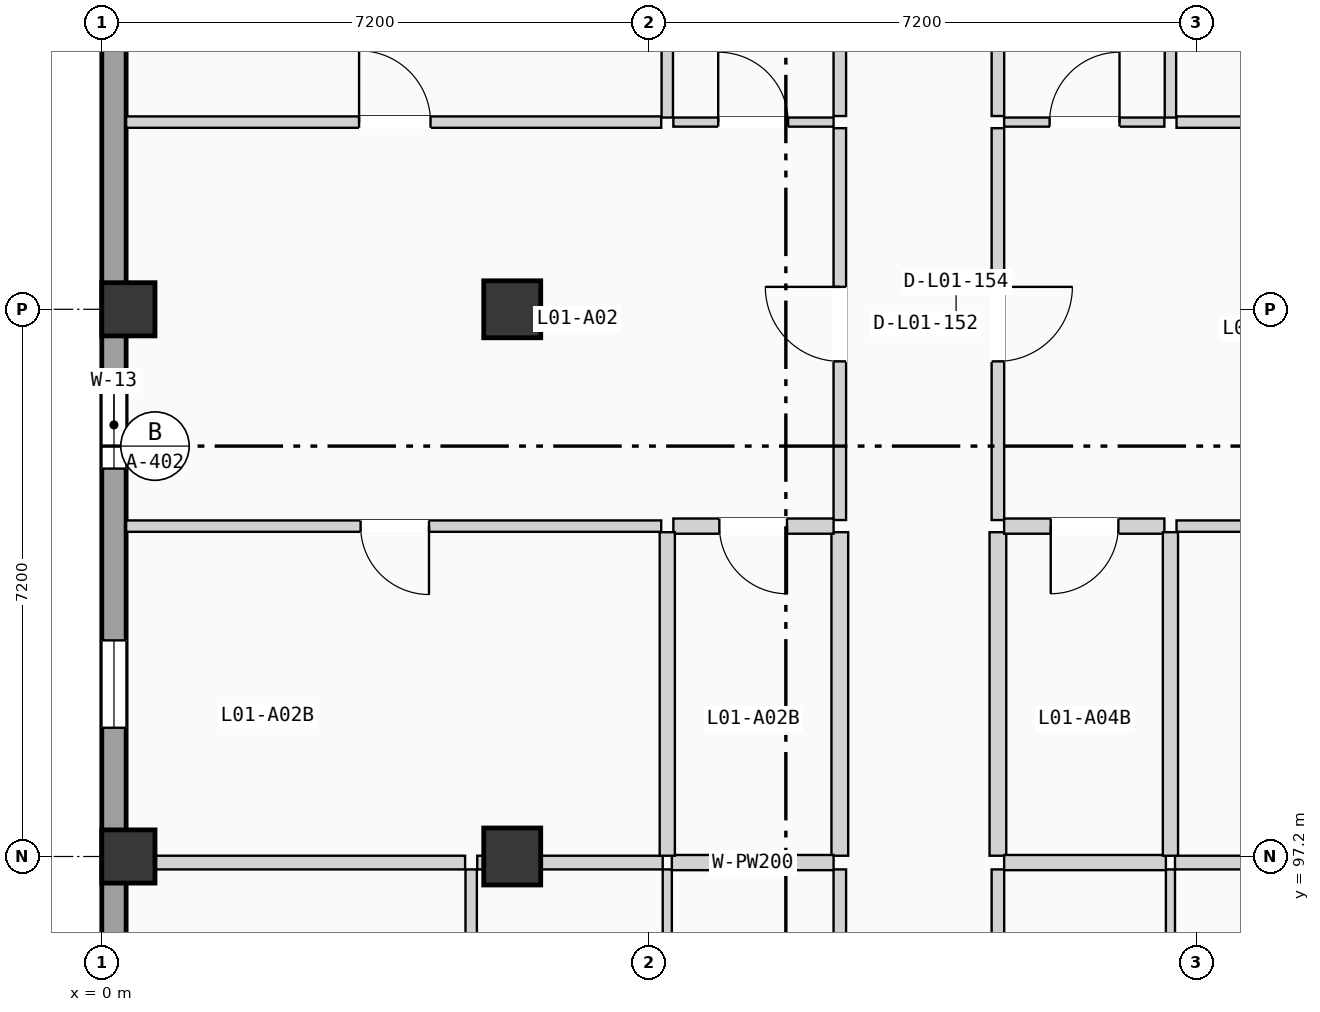
"""IFC4 building model, lengths in metres.
Left out: names, types, materials, properties, quantities, classifications, styles, units other than length and angle.
Written with IfcOpenShell. Run it as: python <this file> out.ifc"""

import sys

from ifc_helpers import new_model, si_unit, direction, frame, frame_2d, origin, origin_2d, place, context, subcontext, project, spatial, rectangle, extrude, element, fill, save


model = new_model("IFC4")
c1 = context("Model", 3, precision=1e-05, world=origin(), true_north=direction((0.0, 1.0)))
c2 = subcontext(c1, "Body", "Model", "MODEL_VIEW")
j1 = project(units=[si_unit("LENGTHUNIT", "METRE"), si_unit("PLANEANGLEUNIT", "RADIAN")], contexts=[c1])
p1 = place(None, origin())
s1 = spatial("IfcSite", under=j1, at=p1, CompositionType="ELEMENT")
p2 = place(p1, origin())
s2 = spatial("IfcBuilding", under=s1, at=p2, CompositionType="ELEMENT")
p3 = place(p2, frame((0.0, 0.0, 4.9)))
s3 = spatial("IfcBuildingStorey", under=s2, at=p3, CompositionType="ELEMENT", Elevation=4.9)
for number, where, z_axis, x_axis in (
    (1, (0.35, 97.2, 0.0), (0.0, 0.0, 1.0), (1.0, 0.0, 0.0)),
    (2, (0.35, 104.4, 0.0), (0.0, 0.0, 1.0), (1.0, 0.0, 0.0)),
):
    element("IfcColumn", number, at=place(p3, frame(where, z_axis=z_axis, x_axis=x_axis)), inside=s3, PredefinedType="COLUMN", context=c2, shape_type="SweptSolid", body=[
        extrude(rectangle(XDim=0.7, YDim=0.7, at=origin_2d()), origin(), (0.0, 0.0, 1.0), 3.675),
    ])
for number, where, z_axis, x_axis in (
    (3, (5.4, 97.2, 0.0), (0.0, 0.0, 1.0), (1.0, 0.0, 0.0)),
    (4, (5.4, 104.4, 0.0), (0.0, 0.0, 1.0), (1.0, 0.0, 0.0)),
):
    element("IfcColumn", number, at=place(p3, frame(where, z_axis=z_axis, x_axis=x_axis)), inside=s3, PredefinedType="COLUMN", context=c2, shape_type="SweptSolid", body=[
        extrude(rectangle(XDim=0.75, YDim=0.75, at=origin_2d()), origin(), (0.0, 0.0, 1.0), 3.675),
    ])
p4 = place(p3, frame((0.16, 68.72, 0.0), z_axis=(0.0, 0.0, 1.0), x_axis=(0.0, 1.0, 0.0)))
e5 = element("IfcWall", 5, at=p4, inside=s3, PredefinedType="SOLIDWALL", context=c2, shape_type="SweptSolid", body=[
    extrude(rectangle(XDim=49.76, YDim=0.32, at=frame_2d((24.88, 0.0))), origin(), (0.0, 0.0, 1.0), 3.415),
])
p5 = place(p4, frame((17.155, 0.0, 0.9)))
e6 = element("IfcOpeningElement", 6, at=p5, cuts=e5, PredefinedType="OPENING", context=c2, shape_type="SweptSolid", body=[
    extrude(rectangle(XDim=1.05, YDim=1.8, at=frame_2d((0.525, 0.9))), frame((0.0, 0.17, 0.0), z_axis=(0.0, -1.0, 0.0), x_axis=(1.0, 0.0, 0.0)), (0.0, 0.0, 1.0), 0.34),
])
p6 = place(p4, frame((9.97, 0.0, 0.9)))
e7 = element("IfcOpeningElement", 7, at=p6, cuts=e5, PredefinedType="OPENING", context=c2, shape_type="SweptSolid", body=[
    extrude(rectangle(XDim=1.15, YDim=1.2, at=frame_2d((0.575, 0.6))), frame((0.0, 0.17, 0.0), z_axis=(0.0, -1.0, 0.0), x_axis=(1.0, 0.0, 0.0)), (0.0, 0.0, 1.0), 0.34),
])
p7 = place(p4, frame((24.305, 0.0, 0.9)))
e8 = element("IfcOpeningElement", 8, at=p7, cuts=e5, PredefinedType="OPENING", context=c2, shape_type="SweptSolid", body=[
    extrude(rectangle(XDim=1.15, YDim=1.35, at=frame_2d((0.575, 0.675))), frame((0.0, 0.17, 0.0), z_axis=(0.0, -1.0, 0.0), x_axis=(1.0, 0.0, 0.0)), (0.0, 0.0, 1.0), 0.34),
])
p8 = place(p4, frame((33.584, 0.0, 0.9)))
e9 = element("IfcOpeningElement", 9, at=p8, cuts=e5, PredefinedType="OPENING", context=c2, shape_type="SweptSolid", body=[
    extrude(rectangle(XDim=1.15, YDim=1.5, at=frame_2d((0.575, 0.75))), frame((0.0, 0.17, 0.0), z_axis=(0.0, -1.0, 0.0), x_axis=(1.0, 0.0, 0.0)), (0.0, 0.0, 1.0), 0.34),
])
p9 = place(p4, frame((30.174, 0.0, 0.9)))
e10 = element("IfcOpeningElement", 10, at=p9, cuts=e5, PredefinedType="OPENING", context=c2, shape_type="SweptSolid", body=[
    extrude(rectangle(XDim=1.15, YDim=1.65, at=frame_2d((0.575, 0.825))), frame((0.0, 0.17, 0.0), z_axis=(0.0, -1.0, 0.0), x_axis=(1.0, 0.0, 0.0)), (0.0, 0.0, 1.0), 0.34),
])
p10 = place(p4, frame((39.776, 0.0, 0.9)))
e11 = element("IfcOpeningElement", 11, at=p10, cuts=e5, PredefinedType="OPENING", context=c2, shape_type="SweptSolid", body=[
    extrude(rectangle(XDim=1.15, YDim=1.8, at=frame_2d((0.575, 0.9))), frame((0.0, 0.17, 0.0), z_axis=(0.0, -1.0, 0.0), x_axis=(1.0, 0.0, 0.0)), (0.0, 0.0, 1.0), 0.34),
])
p11 = place(p3, frame((9.71, 89.13, 0.0), z_axis=(0.0, 0.0, 1.0), x_axis=(0.0, 1.0, 0.0)))
e12 = element("IfcWall", 12, at=p11, inside=s3, PredefinedType="PARTITIONING", context=c2, shape_type="SweptSolid", body=[
    extrude(rectangle(XDim=7.9, YDim=0.165, at=frame_2d((3.95, 0.0))), origin(), (0.0, 0.0, 1.0), 3.395),
])
p12 = place(p3, frame((9.71, 101.627, 0.0), z_axis=(0.0, 0.0, 1.0), x_axis=(0.0, 1.0, 0.0)))
e13 = element("IfcWall", 13, at=p12, inside=s3, PredefinedType="PARTITIONING", context=c2, shape_type="SweptSolid", body=[
    extrude(rectangle(XDim=5.156, YDim=0.165, at=frame_2d((2.578, 0.0))), origin(), (0.0, 0.0, 1.0), 3.395),
])
p13 = place(p12, frame((2.088, 0.0, 0.0)))
e14 = element("IfcOpeningElement", 14, at=p13, cuts=e13, PredefinedType="OPENING", context=c2, shape_type="SweptSolid", body=[
    extrude(rectangle(XDim=0.98, YDim=2.08, at=frame_2d((0.49, 1.04))), frame((0.0, 0.093, 0.0), z_axis=(0.0, -1.0, 0.0), x_axis=(1.0, 0.0, 0.0)), (0.0, 0.0, 1.0), 0.185),
])
p14 = place(p3, frame((9.71, 97.21, 0.0), z_axis=(0.0, 0.0, 1.0), x_axis=(0.0, 1.0, 0.0)))
e15 = element("IfcWall", 15, at=p14, inside=s3, PredefinedType="PLUMBINGWALL", context=c2, shape_type="SweptSolid", body=[
    extrude(rectangle(XDim=4.257, YDim=0.22, at=frame_2d((2.128, 0.0))), origin(), (0.0, 0.0, 1.0), 3.395),
])
p15 = place(p3, frame((9.71, 106.943, 0.0), z_axis=(0.0, 0.0, 1.0), x_axis=(0.0, 1.0, 0.0)))
e16 = element("IfcWall", 16, at=p15, inside=s3, PredefinedType="PARTITIONING", context=c2, shape_type="SweptSolid", body=[
    extrude(rectangle(XDim=4.257, YDim=0.165, at=frame_2d((2.128, 0.0))), origin(), (0.0, 0.0, 1.0), 3.395),
])
p16 = place(p3, frame((11.79, 89.13, 0.0), z_axis=(0.0, 0.0, 1.0), x_axis=(0.0, 1.0, 0.0)))
e17 = element("IfcWall", 17, at=p16, inside=s3, PredefinedType="PARTITIONING", context=c2, shape_type="SweptSolid", body=[
    extrude(rectangle(XDim=7.9, YDim=0.165, at=frame_2d((3.95, 0.0))), origin(), (0.0, 0.0, 1.0), 3.395),
])
p17 = place(p3, frame((11.79, 101.627, 0.0), z_axis=(0.0, 0.0, 1.0), x_axis=(0.0, 1.0, 0.0)))
e18 = element("IfcWall", 18, at=p17, inside=s3, PredefinedType="PARTITIONING", context=c2, shape_type="SweptSolid", body=[
    extrude(rectangle(XDim=5.156, YDim=0.165, at=frame_2d((2.578, 0.0))), origin(), (0.0, 0.0, 1.0), 3.395),
])
p18 = place(p17, frame((2.088, 0.0, 0.0)))
e19 = element("IfcOpeningElement", 19, at=p18, cuts=e18, PredefinedType="OPENING", context=c2, shape_type="SweptSolid", body=[
    extrude(rectangle(XDim=0.98, YDim=2.08, at=frame_2d((0.49, 1.04))), frame((0.0, 0.093, 0.0), z_axis=(0.0, -1.0, 0.0), x_axis=(1.0, 0.0, 0.0)), (0.0, 0.0, 1.0), 0.185),
])
p19 = place(p3, frame((11.79, 97.21, 0.0), z_axis=(0.0, 0.0, 1.0), x_axis=(0.0, 1.0, 0.0)))
e20 = element("IfcWall", 20, at=p19, inside=s3, PredefinedType="PLUMBINGWALL", context=c2, shape_type="SweptSolid", body=[
    extrude(rectangle(XDim=4.257, YDim=0.22, at=frame_2d((2.128, 0.0))), origin(), (0.0, 0.0, 1.0), 3.395),
])
p20 = place(p3, frame((11.79, 106.943, 0.0), z_axis=(0.0, 0.0, 1.0), x_axis=(0.0, 1.0, 0.0)))
e21 = element("IfcWall", 21, at=p20, inside=s3, PredefinedType="PARTITIONING", context=c2, shape_type="SweptSolid", body=[
    extrude(rectangle(XDim=4.257, YDim=0.165, at=frame_2d((2.128, 0.0))), origin(), (0.0, 0.0, 1.0), 3.395),
])
p21 = place(p3, frame((7.44, 89.11, 0.0), z_axis=(0.0, 0.0, 1.0), x_axis=(0.0, 1.0, 0.0)))
e22 = element("IfcWall", 22, at=p21, inside=s3, PredefinedType="PARTITIONING", context=c2, shape_type="SweptSolid", body=[
    extrude(rectangle(XDim=7.92, YDim=0.12, at=frame_2d((3.96, 0.0))), origin(), (0.0, 0.0, 1.0), 3.395),
])
p22 = place(p3, frame((7.5, 97.12, 0.0), z_axis=(0.0, 0.0, 1.0), x_axis=(1.0, 0.0, 0.0)))
e23 = element("IfcWall", 23, at=p22, inside=s3, PredefinedType="PLUMBINGWALL", context=c2, shape_type="SweptSolid", body=[
    extrude(rectangle(XDim=2.128, YDim=0.2, at=frame_2d((1.064, 0.0))), origin(), (0.0, 0.0, 1.0), 2.685),
])
p23 = place(p3, frame((4.86, 89.11, 0.0), z_axis=(0.0, 0.0, 1.0), x_axis=(0.0, 1.0, 0.0)))
e24 = element("IfcWall", 24, at=p23, inside=s3, PredefinedType="PARTITIONING", context=c2, shape_type="SweptSolid", body=[
    extrude(rectangle(XDim=7.92, YDim=0.15, at=frame_2d((3.96, 0.0))), origin(), (0.0, 0.0, 1.0), 3.395),
])
p24 = place(p3, frame((0.32, 97.12, 0.0), z_axis=(0.0, 0.0, 1.0), x_axis=(1.0, 0.0, 0.0)))
e25 = element("IfcWall", 25, at=p24, inside=s3, PredefinedType="PARTITIONING", context=c2, shape_type="SweptSolid", body=[
    extrude(rectangle(XDim=4.46, YDim=0.18, at=frame_2d((2.23, 0.0))), origin(), (0.0, 0.0, 1.0), 2.735),
])
p25 = place(p3, frame((4.94, 97.12, 0.0), z_axis=(0.0, 0.0, 1.0), x_axis=(1.0, 0.0, 0.0)))
e26 = element("IfcWall", 26, at=p25, inside=s3, PredefinedType="PARTITIONING", context=c2, shape_type="SweptSolid", body=[
    extrude(rectangle(XDim=2.44, YDim=0.18, at=frame_2d((1.22, 0.0))), origin(), (0.0, 0.0, 1.0), 2.685),
])
p26 = place(p3, frame((7.52, 101.547, 0.0), z_axis=(0.0, 0.0, 1.0), x_axis=(1.0, 0.0, 0.0)))
e27 = element("IfcWall", 27, at=p26, inside=s3, PredefinedType="PLUMBINGWALL", context=c2, shape_type="SweptSolid", body=[
    extrude(rectangle(XDim=2.108, YDim=0.2, at=frame_2d((1.054, 0.0))), origin(), (0.0, 0.0, 1.0), 3.395),
])
p27 = place(p26, frame((0.605, 0.0, 0.0)))
e28 = element("IfcOpeningElement", 28, at=p27, cuts=e27, PredefinedType="OPENING", context=c2, shape_type="SweptSolid", body=[
    extrude(rectangle(XDim=0.89, YDim=2.03, at=frame_2d((0.445, 1.015))), frame((0.0, 0.11, 0.0), z_axis=(0.0, -1.0, 0.0), x_axis=(1.0, 0.0, 0.0)), (0.0, 0.0, 1.0), 0.22),
])
p28 = place(p3, frame((7.52, 106.863, 0.0), z_axis=(0.0, 0.0, 1.0), x_axis=(1.0, 0.0, 0.0)))
e29 = element("IfcWall", 29, at=p28, inside=s3, PredefinedType="PARTITIONING", context=c2, shape_type="SweptSolid", body=[
    extrude(rectangle(XDim=2.108, YDim=0.12, at=frame_2d((1.054, 0.0))), origin(), (0.0, 0.0, 1.0), 3.395),
])
p29 = place(p28, frame((0.59, 0.0, 0.0)))
e30 = element("IfcOpeningElement", 30, at=p29, cuts=e29, PredefinedType="OPENING", context=c2, shape_type="SweptSolid", body=[
    extrude(rectangle(XDim=0.92, YDim=2.02, at=frame_2d((0.46, 1.01))), frame((0.0, 0.07, 0.0), z_axis=(0.0, -1.0, 0.0), x_axis=(1.0, 0.0, 0.0)), (0.0, 0.0, 1.0), 0.14),
])
p30 = place(p3, frame((0.32, 101.547, 0.0), z_axis=(0.0, 0.0, 1.0), x_axis=(1.0, 0.0, 0.0)))
e31 = element("IfcWall", 31, at=p30, inside=s3, PredefinedType="PARTITIONING", context=c2, shape_type="SweptSolid", body=[
    extrude(rectangle(XDim=7.04, YDim=0.15, at=frame_2d((3.52, 0.0))), origin(), (0.0, 0.0, 1.0), 3.395),
])
p31 = place(p30, frame((3.085, 0.0, 0.0)))
e32 = element("IfcOpeningElement", 32, at=p31, cuts=e31, PredefinedType="OPENING", context=c2, shape_type="SweptSolid", body=[
    extrude(rectangle(XDim=0.9, YDim=2.04, at=frame_2d((0.45, 1.02))), frame((0.0, 0.085, 0.0), z_axis=(0.0, -1.0, 0.0), x_axis=(1.0, 0.0, 0.0)), (0.0, 0.0, 1.0), 0.17),
])
p32 = place(p3, frame((0.32, 106.863, 0.0), z_axis=(0.0, 0.0, 1.0), x_axis=(1.0, 0.0, 0.0)))
e33 = element("IfcWall", 33, at=p32, inside=s3, PredefinedType="PARTITIONING", context=c2, shape_type="SweptSolid", body=[
    extrude(rectangle(XDim=7.04, YDim=0.15, at=frame_2d((3.52, 0.0))), origin(), (0.0, 0.0, 1.0), 3.395),
])
p33 = place(p32, frame((3.065, 0.0, 0.0)))
e34 = element("IfcOpeningElement", 34, at=p33, cuts=e33, PredefinedType="OPENING", context=c2, shape_type="SweptSolid", body=[
    extrude(rectangle(XDim=0.94, YDim=2.06, at=frame_2d((0.47, 1.03))), frame((0.0, 0.085, 0.0), z_axis=(0.0, -1.0, 0.0), x_axis=(1.0, 0.0, 0.0)), (0.0, 0.0, 1.0), 0.17),
])
p34 = place(p3, frame((7.44, 97.21, 0.0), z_axis=(0.0, 0.0, 1.0), x_axis=(0.0, 1.0, 0.0)))
e35 = element("IfcWall", 35, at=p34, inside=s3, PredefinedType="PLUMBINGWALL", context=c2, shape_type="SweptSolid", body=[
    extrude(rectangle(XDim=4.257, YDim=0.2, at=frame_2d((2.128, 0.0))), origin(), (0.0, 0.0, 1.0), 3.395),
])
p35 = place(p3, frame((7.44, 106.923, 0.0), z_axis=(0.0, 0.0, 1.0), x_axis=(0.0, 1.0, 0.0)))
e36 = element("IfcWall", 36, at=p35, inside=s3, PredefinedType="PARTITIONING", context=c2, shape_type="SweptSolid", body=[
    extrude(rectangle(XDim=4.277, YDim=0.15, at=frame_2d((2.138, 0.0))), origin(), (0.0, 0.0, 1.0), 3.395),
])
p36 = place(p3, frame((14.06, 89.11, 0.0), z_axis=(0.0, 0.0, 1.0), x_axis=(0.0, 1.0, 0.0)))
e37 = element("IfcWall", 37, at=p36, inside=s3, PredefinedType="PARTITIONING", context=c2, shape_type="SweptSolid", body=[
    extrude(rectangle(XDim=7.92, YDim=0.12, at=frame_2d((3.96, 0.0))), origin(), (0.0, 0.0, 1.0), 3.395),
])
p37 = place(p3, frame((11.872, 97.12, 0.0), z_axis=(0.0, 0.0, 1.0), x_axis=(1.0, 0.0, 0.0)))
e38 = element("IfcWall", 38, at=p37, inside=s3, PredefinedType="PLUMBINGWALL", context=c2, shape_type="SweptSolid", body=[
    extrude(rectangle(XDim=2.128, YDim=0.2, at=frame_2d((1.064, 0.0))), origin(), (0.0, 0.0, 1.0), 2.685),
])
p38 = place(p3, frame((14.12, 97.12, 0.0), z_axis=(0.0, 0.0, 1.0), x_axis=(1.0, 0.0, 0.0)))
e39 = element("IfcWall", 39, at=p38, inside=s3, PredefinedType="PARTITIONING", context=c2, shape_type="SweptSolid", body=[
    extrude(rectangle(XDim=2.54, YDim=0.18, at=frame_2d((1.27, 0.0))), origin(), (0.0, 0.0, 1.0), 2.685),
])
p39 = place(p3, frame((11.872, 101.547, 0.0), z_axis=(0.0, 0.0, 1.0), x_axis=(1.0, 0.0, 0.0)))
e40 = element("IfcWall", 40, at=p39, inside=s3, PredefinedType="PLUMBINGWALL", context=c2, shape_type="SweptSolid", body=[
    extrude(rectangle(XDim=2.108, YDim=0.2, at=frame_2d((1.054, 0.0))), origin(), (0.0, 0.0, 1.0), 3.395),
])
p40 = place(p39, frame((0.613, 0.0, 0.0)))
e41 = element("IfcOpeningElement", 41, at=p40, cuts=e40, PredefinedType="OPENING", context=c2, shape_type="SweptSolid", body=[
    extrude(rectangle(XDim=0.89, YDim=2.03, at=frame_2d((0.445, 1.015))), frame((0.0, 0.11, 0.0), z_axis=(0.0, -1.0, 0.0), x_axis=(1.0, 0.0, 0.0)), (0.0, 0.0, 1.0), 0.22),
])
p41 = place(p3, frame((11.872, 106.863, 0.0), z_axis=(0.0, 0.0, 1.0), x_axis=(1.0, 0.0, 0.0)))
e42 = element("IfcWall", 42, at=p41, inside=s3, PredefinedType="PARTITIONING", context=c2, shape_type="SweptSolid", body=[
    extrude(rectangle(XDim=2.108, YDim=0.12, at=frame_2d((1.054, 0.0))), origin(), (0.0, 0.0, 1.0), 3.395),
])
p42 = place(p41, frame((0.598, 0.0, 0.0)))
e43 = element("IfcOpeningElement", 43, at=p42, cuts=e42, PredefinedType="OPENING", context=c2, shape_type="SweptSolid", body=[
    extrude(rectangle(XDim=0.92, YDim=2.02, at=frame_2d((0.46, 1.01))), frame((0.0, 0.07, 0.0), z_axis=(0.0, -1.0, 0.0), x_axis=(1.0, 0.0, 0.0)), (0.0, 0.0, 1.0), 0.14),
])
p43 = place(p3, frame((14.14, 101.547, 0.0), z_axis=(0.0, 0.0, 1.0), x_axis=(1.0, 0.0, 0.0)))
e44 = element("IfcWall", 44, at=p43, inside=s3, PredefinedType="PARTITIONING", context=c2, shape_type="SweptSolid", body=[
    extrude(rectangle(XDim=7.14, YDim=0.15, at=frame_2d((3.57, 0.0))), origin(), (0.0, 0.0, 1.0), 3.395),
])
p44 = place(p43, frame((3.015, 0.0, 0.0)))
e45 = element("IfcOpeningElement", 45, at=p44, cuts=e44, PredefinedType="OPENING", context=c2, shape_type="SweptSolid", body=[
    extrude(rectangle(XDim=1.08, YDim=2.1, at=frame_2d((0.54, 1.05))), frame((0.0, 0.085, 0.0), z_axis=(0.0, -1.0, 0.0), x_axis=(1.0, 0.0, 0.0)), (0.0, 0.0, 1.0), 0.17),
])
p45 = place(p3, frame((14.14, 106.863, 0.0), z_axis=(0.0, 0.0, 1.0), x_axis=(1.0, 0.0, 0.0)))
e46 = element("IfcWall", 46, at=p45, inside=s3, PredefinedType="PARTITIONING", context=c2, shape_type="SweptSolid", body=[
    extrude(rectangle(XDim=7.14, YDim=0.15, at=frame_2d((3.57, 0.0))), origin(), (0.0, 0.0, 1.0), 3.395),
])
p46 = place(p45, frame((3.105, 0.0, 0.0)))
e47 = element("IfcOpeningElement", 47, at=p46, cuts=e46, PredefinedType="OPENING", context=c2, shape_type="SweptSolid", body=[
    extrude(rectangle(XDim=0.9, YDim=2.04, at=frame_2d((0.45, 1.02))), frame((0.0, 0.085, 0.0), z_axis=(0.0, -1.0, 0.0), x_axis=(1.0, 0.0, 0.0)), (0.0, 0.0, 1.0), 0.17),
])
p47 = place(p3, frame((14.06, 97.21, 0.0), z_axis=(0.0, 0.0, 1.0), x_axis=(0.0, 1.0, 0.0)))
e48 = element("IfcWall", 48, at=p47, inside=s3, PredefinedType="PLUMBINGWALL", context=c2, shape_type="SweptSolid", body=[
    extrude(rectangle(XDim=4.257, YDim=0.2, at=frame_2d((2.128, 0.0))), origin(), (0.0, 0.0, 1.0), 3.395),
])
p48 = place(p3, frame((14.06, 106.923, 0.0), z_axis=(0.0, 0.0, 1.0), x_axis=(0.0, 1.0, 0.0)))
e49 = element("IfcWall", 49, at=p48, inside=s3, PredefinedType="PARTITIONING", context=c2, shape_type="SweptSolid", body=[
    extrude(rectangle(XDim=4.277, YDim=0.15, at=frame_2d((2.138, 0.0))), origin(), (0.0, 0.0, 1.0), 3.395),
])
p49 = place(p8, origin())
e50 = element("IfcWindow", 50, at=p49, inside=s3, PartitioningType="SINGLE_PANEL", PredefinedType="WINDOW", context=c2, shape_type="SweptSolid", body=[
    extrude(rectangle(XDim=1.15, YDim=1.5, at=frame_2d((0.575, 0.75))), frame((0.0, 0.03, 0.0), z_axis=(0.0, -1.0, 0.0), x_axis=(1.0, 0.0, 0.0)), (0.0, 0.0, 1.0), 0.06),
])
fill(e9, e50)
p50 = place(p9, origin())
e51 = element("IfcWindow", 51, at=p50, inside=s3, PartitioningType="SINGLE_PANEL", PredefinedType="WINDOW", context=c2, shape_type="SweptSolid", body=[
    extrude(rectangle(XDim=1.15, YDim=1.65, at=frame_2d((0.575, 0.825))), frame((0.0, 0.03, 0.0), z_axis=(0.0, -1.0, 0.0), x_axis=(1.0, 0.0, 0.0)), (0.0, 0.0, 1.0), 0.06),
])
fill(e10, e51)
p51 = place(p13, origin())
e52 = element("IfcDoor", 52, at=p51, inside=s3, OperationType="SINGLE_SWING_RIGHT", PredefinedType="DOOR", context=c2, shape_type="SweptSolid", body=[
    extrude(rectangle(XDim=0.98, YDim=2.08, at=frame_2d((0.49, 1.04))), frame((0.0, 0.025, 0.0), z_axis=(0.0, -1.0, 0.0), x_axis=(1.0, 0.0, 0.0)), (0.0, 0.0, 1.0), 0.05),
])
fill(e14, e52)
p52 = place(p18, frame((0.98, 0.0, 0.0), z_axis=(0.0, 0.0, 1.0), x_axis=(-1.0, 0.0, 0.0)))
e53 = element("IfcDoor", 53, at=p52, inside=s3, OperationType="SINGLE_SWING_RIGHT", PredefinedType="DOOR", context=c2, shape_type="SweptSolid", body=[
    extrude(rectangle(XDim=0.98, YDim=2.08, at=frame_2d((0.49, 1.04))), frame((0.0, 0.025, 0.0), z_axis=(0.0, -1.0, 0.0), x_axis=(1.0, 0.0, 0.0)), (0.0, 0.0, 1.0), 0.05),
])
fill(e19, e53)
p53 = place(p27, frame((0.89, 0.0, 0.0), z_axis=(0.0, 0.0, 1.0), x_axis=(-1.0, 0.0, 0.0)))
e54 = element("IfcDoor", 54, at=p53, inside=s3, OperationType="SINGLE_SWING_RIGHT", PredefinedType="DOOR", context=c2, shape_type="SweptSolid", body=[
    extrude(rectangle(XDim=0.89, YDim=2.03, at=frame_2d((0.445, 1.015))), frame((0.0, 0.025, 0.0), z_axis=(0.0, -1.0, 0.0), x_axis=(1.0, 0.0, 0.0)), (0.0, 0.0, 1.0), 0.05),
])
fill(e28, e54)
p54 = place(p29, origin())
e55 = element("IfcDoor", 55, at=p54, inside=s3, OperationType="SINGLE_SWING_LEFT", PredefinedType="DOOR", context=c2, shape_type="SweptSolid", body=[
    extrude(rectangle(XDim=0.92, YDim=2.02, at=frame_2d((0.46, 1.01))), frame((0.0, 0.025, 0.0), z_axis=(0.0, -1.0, 0.0), x_axis=(1.0, 0.0, 0.0)), (0.0, 0.0, 1.0), 0.05),
])
fill(e30, e55)
p55 = place(p31, frame((0.9, 0.0, 0.0), z_axis=(0.0, 0.0, 1.0), x_axis=(-1.0, 0.0, 0.0)))
e56 = element("IfcDoor", 56, at=p55, inside=s3, OperationType="SINGLE_SWING_RIGHT", PredefinedType="DOOR", context=c2, shape_type="SweptSolid", body=[
    extrude(rectangle(XDim=0.9, YDim=2.04, at=frame_2d((0.45, 1.02))), frame((0.0, 0.025, 0.0), z_axis=(0.0, -1.0, 0.0), x_axis=(1.0, 0.0, 0.0)), (0.0, 0.0, 1.0), 0.05),
])
fill(e32, e56)
p56 = place(p33, origin())
e57 = element("IfcDoor", 57, at=p56, inside=s3, OperationType="SINGLE_SWING_LEFT", PredefinedType="DOOR", context=c2, shape_type="SweptSolid", body=[
    extrude(rectangle(XDim=0.94, YDim=2.06, at=frame_2d((0.47, 1.03))), frame((0.0, 0.025, 0.0), z_axis=(0.0, -1.0, 0.0), x_axis=(1.0, 0.0, 0.0)), (0.0, 0.0, 1.0), 0.05),
])
fill(e34, e57)
p57 = place(p40, frame((0.89, 0.0, 0.0), z_axis=(0.0, 0.0, 1.0), x_axis=(-1.0, 0.0, 0.0)))
e58 = element("IfcDoor", 58, at=p57, inside=s3, OperationType="SINGLE_SWING_LEFT", PredefinedType="DOOR", context=c2, shape_type="SweptSolid", body=[
    extrude(rectangle(XDim=0.89, YDim=2.03, at=frame_2d((0.445, 1.015))), frame((0.0, 0.025, 0.0), z_axis=(0.0, -1.0, 0.0), x_axis=(1.0, 0.0, 0.0)), (0.0, 0.0, 1.0), 0.05),
])
fill(e41, e58)
p58 = place(p42, origin())
e59 = element("IfcDoor", 59, at=p58, inside=s3, OperationType="SINGLE_SWING_RIGHT", PredefinedType="DOOR", context=c2, shape_type="SweptSolid", body=[
    extrude(rectangle(XDim=0.92, YDim=2.02, at=frame_2d((0.46, 1.01))), frame((0.0, 0.025, 0.0), z_axis=(0.0, -1.0, 0.0), x_axis=(1.0, 0.0, 0.0)), (0.0, 0.0, 1.0), 0.05),
])
fill(e43, e59)
save(model, sys.argv[1])
